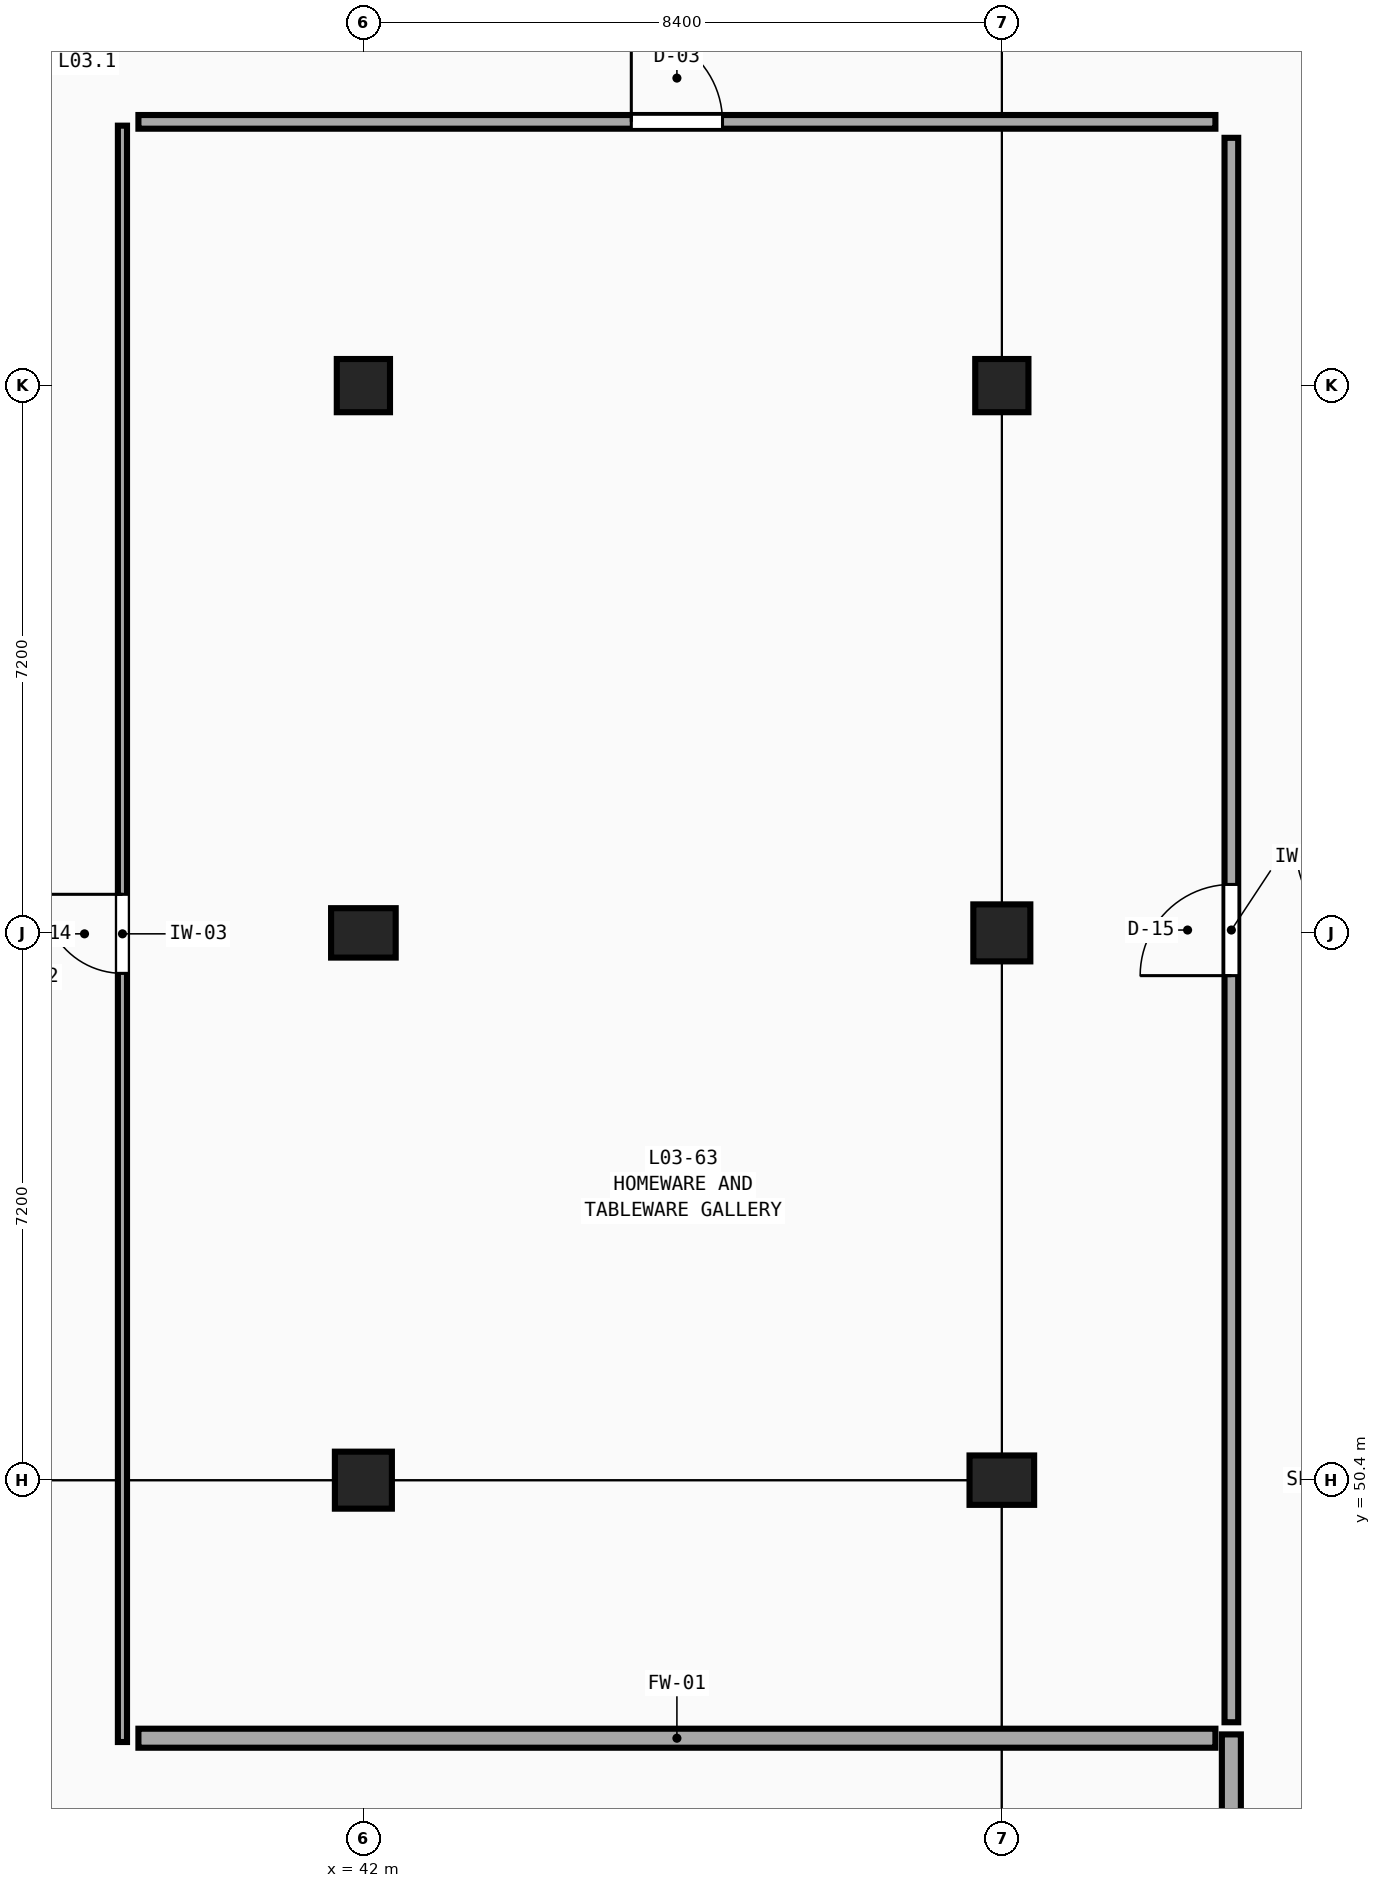
"""IFC4 building model, lengths in metres.
Left out: names, types, materials, properties, quantities, classifications, styles, units other than length and angle.
Written with IfcOpenShell. Run it as: python <this file> out.ifc"""

import sys

from ifc_helpers import new_model, si_unit, direction, frame, frame_2d, origin, origin_2d, place, context, subcontext, project, spatial, rectangle, extrude, element, fill, save


model = new_model("IFC4")
c1 = context("Model", 3, precision=1e-05, world=origin(), true_north=direction((0.0, 1.0)))
c2 = subcontext(c1, "Body", "Model", "MODEL_VIEW")
j1 = project(units=[si_unit("LENGTHUNIT", "METRE"), si_unit("PLANEANGLEUNIT", "RADIAN")], contexts=[c1])
p1 = place(None, origin())
s1 = spatial("IfcSite", under=j1, at=p1, CompositionType="ELEMENT")
p2 = place(p1, origin())
s2 = spatial("IfcBuilding", under=s1, at=p2, CompositionType="ELEMENT")
p3 = place(p2, frame((0.0, 0.0, 14.4)))
s3 = spatial("IfcBuildingStorey", under=s2, at=p3, CompositionType="ELEMENT", Elevation=14.4)
p4 = place(p3, frame((42.0, 50.4, 0.0), z_axis=(0.0, 0.0, 1.0), x_axis=(1.0, 0.0, 0.0)))
e1 = element("IfcColumn", 1, at=p4, inside=s3, PredefinedType="COLUMN", context=c2, shape_type="SweptSolid", body=[
    extrude(rectangle(XDim=0.75, YDim=0.75, at=origin_2d()), origin(), (0.0, 0.0, 1.0), 4.5),
])
p5 = place(p3, frame((42.0, 57.6, 0.0), z_axis=(0.0, 0.0, 1.0), x_axis=(1.0, 0.0, 0.0)))
e2 = element("IfcColumn", 2, at=p5, inside=s3, PredefinedType="COLUMN", context=c2, shape_type="SweptSolid", body=[
    extrude(rectangle(XDim=0.85, YDim=0.65, at=origin_2d()), origin(), (0.0, 0.0, 1.0), 4.5),
])
p6 = place(p3, frame((42.0, 64.8, 0.0), z_axis=(0.0, 0.0, 1.0), x_axis=(1.0, 0.0, 0.0)))
e3 = element("IfcColumn", 3, at=p6, inside=s3, PredefinedType="COLUMN", context=c2, shape_type="SweptSolid", body=[
    extrude(rectangle(XDim=0.7, YDim=0.7, at=origin_2d()), origin(), (0.0, 0.0, 1.0), 4.5),
])
p7 = place(p3, frame((50.4, 50.4, 0.0), z_axis=(0.0, 0.0, 1.0), x_axis=(1.0, 0.0, 0.0)))
e4 = element("IfcColumn", 4, at=p7, inside=s3, PredefinedType="COLUMN", context=c2, shape_type="SweptSolid", body=[
    extrude(rectangle(XDim=0.85, YDim=0.65, at=origin_2d()), origin(), (0.0, 0.0, 1.0), 4.5),
])
p8 = place(p3, frame((50.4, 57.6, 0.0), z_axis=(0.0, 0.0, 1.0), x_axis=(1.0, 0.0, 0.0)))
e5 = element("IfcColumn", 5, at=p8, inside=s3, PredefinedType="COLUMN", context=c2, shape_type="SweptSolid", body=[
    extrude(rectangle(XDim=0.75, YDim=0.75, at=origin_2d()), origin(), (0.0, 0.0, 1.0), 4.5),
])
p9 = place(p3, frame((50.4, 64.8, 0.0), z_axis=(0.0, 0.0, 1.0), x_axis=(1.0, 0.0, 0.0)))
e6 = element("IfcColumn", 6, at=p9, inside=s3, PredefinedType="COLUMN", context=c2, shape_type="SweptSolid", body=[
    extrude(rectangle(XDim=0.7, YDim=0.7, at=origin_2d()), origin(), (0.0, 0.0, 1.0), 4.5),
])
p10 = place(p3, frame((38.83, 46.955, 0.0), z_axis=(0.0, 0.0, 1.0), x_axis=(0.0, 1.0, 0.0)))
e7 = element("IfcWall", 7, at=p10, inside=s3, PredefinedType="PARTITIONING", context=c2, shape_type="SweptSolid", body=[
    extrude(rectangle(XDim=21.265, YDim=0.12, at=frame_2d((10.632, 0.0))), origin(), (0.0, 0.0, 1.0), 4.18),
])
p11 = place(p10, frame((10.113, 0.0, 0.0)))
e8 = element("IfcOpeningElement", 8, at=p11, cuts=e7, PredefinedType="OPENING", context=c2, shape_type="SweptSolid", body=[
    extrude(rectangle(XDim=1.04, YDim=2.21, at=frame_2d((0.52, 1.105))), frame((0.0, 0.08, 0.0), z_axis=(0.0, -1.0, 0.0), x_axis=(1.0, 0.0, 0.0)), (0.0, 0.0, 1.0), 0.16),
])
p12 = place(p3, frame((53.42, 47.215, 0.0), z_axis=(0.0, 0.0, 1.0), x_axis=(0.0, 1.0, 0.0)))
e9 = element("IfcWall", 9, at=p12, inside=s3, PredefinedType="PARTITIONING", context=c2, shape_type="SweptSolid", body=[
    extrude(rectangle(XDim=20.845, YDim=0.18, at=frame_2d((10.422, 0.0))), origin(), (0.0, 0.0, 1.0), 4.18),
])
p13 = place(p12, frame((9.823, 0.0, 0.0)))
e10 = element("IfcOpeningElement", 10, at=p13, cuts=e9, PredefinedType="OPENING", context=c2, shape_type="SweptSolid", body=[
    extrude(rectangle(XDim=1.2, YDim=2.21, at=frame_2d((0.6, 1.105))), frame((0.0, 0.11, 0.0), z_axis=(0.0, -1.0, 0.0), x_axis=(1.0, 0.0, 0.0)), (0.0, 0.0, 1.0), 0.22),
])
p14 = place(p3, frame((39.04, 68.27, 0.0), z_axis=(0.0, 0.0, 1.0), x_axis=(1.0, 0.0, 0.0)))
e11 = element("IfcWall", 11, at=p14, inside=s3, PredefinedType="PARTITIONING", context=c2, shape_type="SweptSolid", body=[
    extrude(rectangle(XDim=14.17, YDim=0.18, at=frame_2d((7.085, 0.0))), origin(), (0.0, 0.0, 1.0), 4.18),
])
p15 = place(p14, frame((6.485, 0.0, 0.0)))
e12 = element("IfcOpeningElement", 12, at=p15, cuts=e11, PredefinedType="OPENING", context=c2, shape_type="SweptSolid", body=[
    extrude(rectangle(XDim=1.2, YDim=2.05, at=frame_2d((0.6, 1.025))), frame((0.0, 0.11, 0.0), z_axis=(0.0, -1.0, 0.0), x_axis=(1.0, 0.0, 0.0)), (0.0, 0.0, 1.0), 0.22),
])
p16 = place(p3, frame((53.42, 36.37, 0.0), z_axis=(0.0, 0.0, 1.0), x_axis=(0.0, 1.0, 0.0)))
e13 = element("IfcWall", 13, at=p16, inside=s3, PredefinedType="SOLIDWALL", context=c2, shape_type="SweptSolid", body=[
    extrude(rectangle(XDim=10.685, YDim=0.25, at=frame_2d((5.342, 0.0))), origin(), (0.0, 0.0, 1.0), 4.18),
])
p17 = place(p16, frame((4.442, 0.0, 0.0)))
e14 = element("IfcOpeningElement", 14, at=p17, cuts=e13, PredefinedType="OPENING", context=c2, shape_type="SweptSolid", body=[
    extrude(rectangle(XDim=1.8, YDim=2.3, at=frame_2d((0.9, 1.15))), frame((0.0, 0.145, 0.0), z_axis=(0.0, -1.0, 0.0), x_axis=(1.0, 0.0, 0.0)), (0.0, 0.0, 1.0), 0.29),
])
p18 = place(p3, frame((39.04, 47.005, 0.0), z_axis=(0.0, 0.0, 1.0), x_axis=(1.0, 0.0, 0.0)))
e15 = element("IfcWall", 15, at=p18, inside=s3, PredefinedType="SOLIDWALL", context=c2, shape_type="SweptSolid", body=[
    extrude(rectangle(XDim=14.17, YDim=0.25, at=frame_2d((7.085, 0.0))), origin(), (0.0, 0.0, 1.0), 4.18),
])
p19 = place(p11, origin())
e16 = element("IfcDoor", 16, at=p19, inside=s3, OperationType="SINGLE_SWING_RIGHT", PredefinedType="DOOR", context=c2, shape_type="SweptSolid", body=[
    extrude(rectangle(XDim=1.04, YDim=2.21, at=frame_2d((0.52, 1.105))), frame((0.0, 0.025, 0.0), z_axis=(0.0, -1.0, 0.0), x_axis=(1.0, 0.0, 0.0)), (0.0, 0.0, 1.0), 0.05),
])
fill(e8, e16)
p20 = place(p13, origin())
e17 = element("IfcDoor", 17, at=p20, inside=s3, OperationType="SINGLE_SWING_LEFT", PredefinedType="DOOR", context=c2, shape_type="SweptSolid", body=[
    extrude(rectangle(XDim=1.2, YDim=2.21, at=frame_2d((0.6, 1.105))), frame((0.0, 0.025, 0.0), z_axis=(0.0, -1.0, 0.0), x_axis=(1.0, 0.0, 0.0)), (0.0, 0.0, 1.0), 0.05),
])
fill(e10, e17)
p21 = place(p15, origin())
e18 = element("IfcDoor", 18, at=p21, inside=s3, OperationType="SINGLE_SWING_LEFT", PredefinedType="DOOR", context=c2, shape_type="SweptSolid", body=[
    extrude(rectangle(XDim=1.2, YDim=2.05, at=frame_2d((0.6, 1.025))), frame((0.0, 0.025, 0.0), z_axis=(0.0, -1.0, 0.0), x_axis=(1.0, 0.0, 0.0)), (0.0, 0.0, 1.0), 0.05),
])
fill(e12, e18)
save(model, sys.argv[1])
